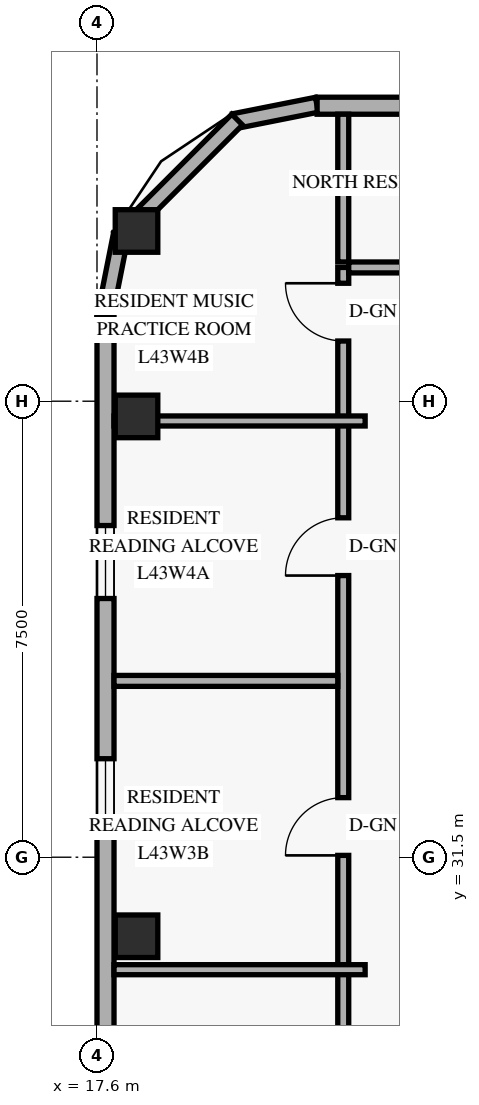
"""IFC4 building model, lengths in metres.
Left out: names, types, materials, properties, quantities, classifications, styles, units other than length and angle.
Written with IfcOpenShell. Run it as: python <this file> out.ifc"""

import sys

from ifc_helpers import new_model, si_unit, direction, frame, frame_2d, origin, origin_2d, place, context, subcontext, project, spatial, rectangle, extrude, element, fill, save


model = new_model("IFC4")
c1 = context("Model", 3, precision=1e-05, world=origin(), true_north=direction((0.0, 1.0)))
c2 = subcontext(c1, "Body", "Model", "MODEL_VIEW")
j1 = project(units=[si_unit("LENGTHUNIT", "METRE"), si_unit("PLANEANGLEUNIT", "RADIAN")], contexts=[c1])
p1 = place(None, origin())
s1 = spatial("IfcSite", under=j1, at=p1, CompositionType="ELEMENT")
p2 = place(p1, origin())
s2 = spatial("IfcBuilding", under=s1, at=p2, CompositionType="ELEMENT")
p3 = place(p2, frame((0.0, 0.0, 166.2)))
s3 = spatial("IfcBuildingStorey", under=s2, at=p3, CompositionType="ELEMENT", Elevation=166.2)
for number, where, z_axis, x_axis in (
    (1, (18.25, 30.2, 0.0), (0.0, 0.0, 1.0), (1.0, 0.0, 0.0)),
    (2, (18.25, 38.75, 0.0), (0.0, 0.0, 1.0), (1.0, 0.0, 0.0)),
    (3, (18.25, 41.8, 0.0), (0.0, 0.0, 1.0), (1.0, 0.0, 0.0)),
):
    element("IfcColumn", number, at=place(p3, frame(where, z_axis=z_axis, x_axis=x_axis)), inside=s3, PredefinedType="COLUMN", context=c2, shape_type="SweptSolid", body=[
        extrude(rectangle(XDim=0.7, YDim=0.7, at=origin_2d()), origin(), (0.0, 0.0, 1.0), 3.6),
    ])
p4 = place(p3, frame((21.217, 43.876, 0.0), z_axis=(0.0, 0.0, 1.0), x_axis=(-0.980809899341, -0.19496651342, 0.0)))
e4 = element("IfcWall", 4, at=p4, inside=s3, PredefinedType="SOLIDWALL", context=c2, shape_type="SweptSolid", body=[
    extrude(rectangle(XDim=1.389, YDim=0.25, at=frame_2d((0.694, 0.0))), origin(), (0.0, 0.0, 1.0), 3.36),
])
p5 = place(p3, frame((19.905, 43.632, 0.0), z_axis=(0.0, 0.0, 1.0), x_axis=(-0.707106781187, -0.707106781187, 0.0)))
e5 = element("IfcWall", 5, at=p5, inside=s3, PredefinedType="SOLIDWALL", context=c2, shape_type="SweptSolid", body=[
    extrude(rectangle(XDim=2.739, YDim=0.25, at=frame_2d((1.37, 0.0))), origin(), (0.0, 0.0, 1.0), 3.36),
])
p6 = place(p3, frame((17.995, 41.746, 0.0), z_axis=(0.0, 0.0, 1.0), x_axis=(-0.195135625965, -0.9807762678, 0.0)))
e6 = element("IfcWall", 6, at=p6, inside=s3, PredefinedType="SOLIDWALL", context=c2, shape_type="SweptSolid", body=[
    extrude(rectangle(XDim=1.389, YDim=0.25, at=frame_2d((0.694, 0.0))), origin(), (0.0, 0.0, 1.0), 3.36),
])
p7 = place(p3, frame((54.98, 43.86, 0.0), z_axis=(0.0, 0.0, 1.0), x_axis=(-1.0, 0.0, 0.0)))
e7 = element("IfcWall", 7, at=p7, inside=s3, PredefinedType="SOLIDWALL", context=c2, shape_type="SweptSolid", body=[
    extrude(rectangle(XDim=33.76, YDim=0.28, at=frame_2d((16.88, 0.0))), origin(), (0.0, 0.0, 1.0), 3.36),
])
p8 = place(p7, frame((28.055, 0.0, 0.85)))
e8 = element("IfcOpeningElement", 8, at=p8, cuts=e7, PredefinedType="OPENING", context=c2, shape_type="SweptSolid", body=[
    extrude(rectangle(XDim=1.8, YDim=1.6, at=frame_2d((0.9, 0.8))), frame((0.0, 0.15, 0.0), z_axis=(0.0, -1.0, 0.0), x_axis=(1.0, 0.0, 0.0)), (0.0, 0.0, 1.0), 0.3),
])
p9 = place(p7, frame((21.17, 0.0, 0.85)))
e9 = element("IfcOpeningElement", 9, at=p9, cuts=e7, PredefinedType="OPENING", context=c2, shape_type="SweptSolid", body=[
    extrude(rectangle(XDim=1.8, YDim=1.6, at=frame_2d((0.9, 0.8))), frame((0.0, 0.15, 0.0), z_axis=(0.0, -1.0, 0.0), x_axis=(1.0, 0.0, 0.0)), (0.0, 0.0, 1.0), 0.3),
])
p10 = place(p7, frame((15.207, 0.0, 0.85)))
e10 = element("IfcOpeningElement", 10, at=p10, cuts=e7, PredefinedType="OPENING", context=c2, shape_type="SweptSolid", body=[
    extrude(rectangle(XDim=1.8, YDim=1.6, at=frame_2d((0.9, 0.8))), frame((0.0, 0.15, 0.0), z_axis=(0.0, -1.0, 0.0), x_axis=(1.0, 0.0, 0.0)), (0.0, 0.0, 1.0), 0.3),
])
p11 = place(p7, frame((9.684, 0.0, 0.85)))
e11 = element("IfcOpeningElement", 11, at=p11, cuts=e7, PredefinedType="OPENING", context=c2, shape_type="SweptSolid", body=[
    extrude(rectangle(XDim=1.8, YDim=1.6, at=frame_2d((0.9, 0.8))), frame((0.0, 0.15, 0.0), z_axis=(0.0, -1.0, 0.0), x_axis=(1.0, 0.0, 0.0)), (0.0, 0.0, 1.0), 0.3),
])
p12 = place(p7, frame((7.014, 0.0, 0.85)))
e12 = element("IfcOpeningElement", 12, at=p12, cuts=e7, PredefinedType="OPENING", context=c2, shape_type="SweptSolid", body=[
    extrude(rectangle(XDim=1.2, YDim=1.5, at=frame_2d((0.6, 0.75))), frame((0.0, 0.15, 0.0), z_axis=(0.0, -1.0, 0.0), x_axis=(1.0, 0.0, 0.0)), (0.0, 0.0, 1.0), 0.3),
])
p13 = place(p7, frame((2.457, 0.0, 0.85)))
e13 = element("IfcOpeningElement", 13, at=p13, cuts=e7, PredefinedType="OPENING", context=c2, shape_type="SweptSolid", body=[
    extrude(rectangle(XDim=1.8, YDim=1.6, at=frame_2d((0.9, 0.8))), frame((0.0, 0.15, 0.0), z_axis=(0.0, -1.0, 0.0), x_axis=(1.0, 0.0, 0.0)), (0.0, 0.0, 1.0), 0.3),
])
p14 = place(p3, frame((17.74, 40.38, 0.0), z_axis=(0.0, 0.0, 1.0), x_axis=(0.0, -1.0, 0.0)))
e14 = element("IfcWall", 14, at=p14, inside=s3, PredefinedType="SOLIDWALL", context=c2, shape_type="SweptSolid", body=[
    extrude(rectangle(XDim=32.76, YDim=0.28, at=frame_2d((16.38, 0.0))), origin(), (0.0, 0.0, 1.0), 3.36),
])
p15 = place(p14, frame((28.135, 0.0, 0.85)))
e15 = element("IfcOpeningElement", 15, at=p15, cuts=e14, PredefinedType="OPENING", context=c2, shape_type="SweptSolid", body=[
    extrude(rectangle(XDim=1.2, YDim=1.5, at=frame_2d((0.6, 0.75))), frame((0.0, 0.15, 0.0), z_axis=(0.0, -1.0, 0.0), x_axis=(1.0, 0.0, 0.0)), (0.0, 0.0, 1.0), 0.3),
])
p16 = place(p14, frame((24.425, 0.0, 0.85)))
e16 = element("IfcOpeningElement", 16, at=p16, cuts=e14, PredefinedType="OPENING", context=c2, shape_type="SweptSolid", body=[
    extrude(rectangle(XDim=1.2, YDim=1.5, at=frame_2d((0.6, 0.75))), frame((0.0, 0.15, 0.0), z_axis=(0.0, -1.0, 0.0), x_axis=(1.0, 0.0, 0.0)), (0.0, 0.0, 1.0), 0.3),
])
p17 = place(p14, frame((18.38, 0.0, 0.85)))
e17 = element("IfcOpeningElement", 17, at=p17, cuts=e14, PredefinedType="OPENING", context=c2, shape_type="SweptSolid", body=[
    extrude(rectangle(XDim=1.2, YDim=1.5, at=frame_2d((0.6, 0.75))), frame((0.0, 0.15, 0.0), z_axis=(0.0, -1.0, 0.0), x_axis=(1.0, 0.0, 0.0)), (0.0, 0.0, 1.0), 0.3),
])
p18 = place(p14, frame((12.955, 0.0, 0.85)))
e18 = element("IfcOpeningElement", 18, at=p18, cuts=e14, PredefinedType="OPENING", context=c2, shape_type="SweptSolid", body=[
    extrude(rectangle(XDim=1.2, YDim=1.5, at=frame_2d((0.6, 0.75))), frame((0.0, 0.15, 0.0), z_axis=(0.0, -1.0, 0.0), x_axis=(1.0, 0.0, 0.0)), (0.0, 0.0, 1.0), 0.3),
])
p19 = place(p14, frame((7.26, 0.0, 0.85)))
e19 = element("IfcOpeningElement", 19, at=p19, cuts=e14, PredefinedType="OPENING", context=c2, shape_type="SweptSolid", body=[
    extrude(rectangle(XDim=1.2, YDim=1.5, at=frame_2d((0.6, 0.75))), frame((0.0, 0.15, 0.0), z_axis=(0.0, -1.0, 0.0), x_axis=(1.0, 0.0, 0.0)), (0.0, 0.0, 1.0), 0.3),
])
p20 = place(p14, frame((3.425, 0.0, 0.85)))
e20 = element("IfcOpeningElement", 20, at=p20, cuts=e14, PredefinedType="OPENING", context=c2, shape_type="SweptSolid", body=[
    extrude(rectangle(XDim=1.2, YDim=1.5, at=frame_2d((0.6, 0.75))), frame((0.0, 0.15, 0.0), z_axis=(0.0, -1.0, 0.0), x_axis=(1.0, 0.0, 0.0)), (0.0, 0.0, 1.0), 0.3),
])
p21 = place(p3, frame((21.65, 6.8, 0.0), z_axis=(0.0, 0.0, 1.0), x_axis=(0.0, 1.0, 0.0)))
e21 = element("IfcWall", 21, at=p21, inside=s3, PredefinedType="STANDARD", context=c2, shape_type="SweptSolid", body=[
    extrude(rectangle(XDim=34.4, YDim=0.18, at=frame_2d((17.2, 0.0))), origin(), (0.0, 0.0, 1.0), 2.73),
])
p22 = place(p21, frame((0.3, 0.0, 0.0)))
e22 = element("IfcOpeningElement", 22, at=p22, cuts=e21, PredefinedType="OPENING", context=c2, shape_type="SweptSolid", body=[
    extrude(rectangle(XDim=0.95, YDim=2.15, at=frame_2d((0.475, 1.075))), frame((0.0, 0.1, 0.0), z_axis=(0.0, -1.0, 0.0), x_axis=(1.0, 0.0, 0.0)), (0.0, 0.0, 1.0), 0.2),
])
p23 = place(p21, frame((3.718, 0.0, 0.0)))
e23 = element("IfcOpeningElement", 23, at=p23, cuts=e21, PredefinedType="OPENING", context=c2, shape_type="SweptSolid", body=[
    extrude(rectangle(XDim=0.95, YDim=2.15, at=frame_2d((0.475, 1.075))), frame((0.0, 0.1, 0.0), z_axis=(0.0, -1.0, 0.0), x_axis=(1.0, 0.0, 0.0)), (0.0, 0.0, 1.0), 0.2),
])
p24 = place(p21, frame((8.995, 0.0, 0.0)))
e24 = element("IfcOpeningElement", 24, at=p24, cuts=e21, PredefinedType="OPENING", context=c2, shape_type="SweptSolid", body=[
    extrude(rectangle(XDim=0.95, YDim=2.15, at=frame_2d((0.475, 1.075))), frame((0.0, 0.1, 0.0), z_axis=(0.0, -1.0, 0.0), x_axis=(1.0, 0.0, 0.0)), (0.0, 0.0, 1.0), 0.2),
])
p25 = place(p21, frame((14.105, 0.0, 0.0)))
e25 = element("IfcOpeningElement", 25, at=p25, cuts=e21, PredefinedType="OPENING", context=c2, shape_type="SweptSolid", body=[
    extrude(rectangle(XDim=0.95, YDim=2.15, at=frame_2d((0.475, 1.075))), frame((0.0, 0.1, 0.0), z_axis=(0.0, -1.0, 0.0), x_axis=(1.0, 0.0, 0.0)), (0.0, 0.0, 1.0), 0.2),
])
p26 = place(p21, frame((19.62, 0.0, 0.0)))
e26 = element("IfcOpeningElement", 26, at=p26, cuts=e21, PredefinedType="OPENING", context=c2, shape_type="SweptSolid", body=[
    extrude(rectangle(XDim=0.95, YDim=2.15, at=frame_2d((0.475, 1.075))), frame((0.0, 0.1, 0.0), z_axis=(0.0, -1.0, 0.0), x_axis=(1.0, 0.0, 0.0)), (0.0, 0.0, 1.0), 0.2),
])
p27 = place(p21, frame((24.73, 0.0, 0.0)))
e27 = element("IfcOpeningElement", 27, at=p27, cuts=e21, PredefinedType="OPENING", context=c2, shape_type="SweptSolid", body=[
    extrude(rectangle(XDim=0.95, YDim=2.15, at=frame_2d((0.475, 1.075))), frame((0.0, 0.1, 0.0), z_axis=(0.0, -1.0, 0.0), x_axis=(1.0, 0.0, 0.0)), (0.0, 0.0, 1.0), 0.2),
])
p28 = place(p21, frame((29.333, 0.0, 0.0)))
e28 = element("IfcOpeningElement", 28, at=p28, cuts=e21, PredefinedType="OPENING", context=c2, shape_type="SweptSolid", body=[
    extrude(rectangle(XDim=0.95, YDim=2.15, at=frame_2d((0.475, 1.075))), frame((0.0, 0.1, 0.0), z_axis=(0.0, -1.0, 0.0), x_axis=(1.0, 0.0, 0.0)), (0.0, 0.0, 1.0), 0.2),
])
p29 = place(p21, frame((33.19, 0.0, 0.0)))
e29 = element("IfcOpeningElement", 29, at=p29, cuts=e21, PredefinedType="OPENING", context=c2, shape_type="SweptSolid", body=[
    extrude(rectangle(XDim=0.95, YDim=2.15, at=frame_2d((0.475, 1.075))), frame((0.0, 0.1, 0.0), z_axis=(0.0, -1.0, 0.0), x_axis=(1.0, 0.0, 0.0)), (0.0, 0.0, 1.0), 0.2),
])
p30 = place(p3, frame((21.74, 41.2, 0.0), z_axis=(0.0, 0.0, 1.0), x_axis=(1.0, 0.0, 0.0)))
e30 = element("IfcWall", 30, at=p30, inside=s3, PredefinedType="STANDARD", context=c2, shape_type="SweptSolid", body=[
    extrude(rectangle(XDim=13.68, YDim=0.18, at=frame_2d((6.84, 0.0))), origin(), (0.0, 0.0, 1.0), 2.73),
])
p31 = place(p30, frame((2.95, 0.0, 0.0)))
e31 = element("IfcOpeningElement", 31, at=p31, cuts=e30, PredefinedType="OPENING", context=c2, shape_type="SweptSolid", body=[
    extrude(rectangle(XDim=0.95, YDim=2.15, at=frame_2d((0.475, 1.075))), frame((0.0, 0.1, 0.0), z_axis=(0.0, -1.0, 0.0), x_axis=(1.0, 0.0, 0.0)), (0.0, 0.0, 1.0), 0.2),
])
p32 = place(p30, frame((10.11, 0.0, 0.0)))
e32 = element("IfcOpeningElement", 32, at=p32, cuts=e30, PredefinedType="OPENING", context=c2, shape_type="SweptSolid", body=[
    extrude(rectangle(XDim=0.95, YDim=2.15, at=frame_2d((0.475, 1.075))), frame((0.0, 0.1, 0.0), z_axis=(0.0, -1.0, 0.0), x_axis=(1.0, 0.0, 0.0)), (0.0, 0.0, 1.0), 0.2),
])
p33 = place(p3, frame((21.65, 41.29, 0.0), z_axis=(0.0, 0.0, 1.0), x_axis=(0.0, 1.0, 0.0)))
e33 = element("IfcWall", 33, at=p33, inside=s3, PredefinedType="PARTITIONING", context=c2, shape_type="SweptSolid", body=[
    extrude(rectangle(XDim=2.43, YDim=0.18, at=frame_2d((1.215, 0.0))), origin(), (0.0, 0.0, 1.0), 2.879),
])
p34 = place(p3, frame((17.88, 29.65, 0.0), z_axis=(0.0, 0.0, 1.0), x_axis=(1.0, 0.0, 0.0)))
e34 = element("IfcWall", 34, at=p34, inside=s3, PredefinedType="PARTITIONING", context=c2, shape_type="SweptSolid", body=[
    extrude(rectangle(XDim=4.13, YDim=0.165, at=frame_2d((2.065, 0.0))), origin(), (0.0, 0.0, 1.0), 2.879),
])
p35 = place(p3, frame((17.88, 34.4, 0.0), z_axis=(0.0, 0.0, 1.0), x_axis=(1.0, 0.0, 0.0)))
e35 = element("IfcWall", 35, at=p35, inside=s3, PredefinedType="PARTITIONING", context=c2, shape_type="SweptSolid", body=[
    extrude(rectangle(XDim=3.68, YDim=0.18, at=frame_2d((1.84, 0.0))), origin(), (0.0, 0.0, 1.0), 2.879),
])
p36 = place(p3, frame((17.88, 38.675, 0.0), z_axis=(0.0, 0.0, 1.0), x_axis=(1.0, 0.0, 0.0)))
e36 = element("IfcWall", 36, at=p36, inside=s3, PredefinedType="PARTITIONING", context=c2, shape_type="SweptSolid", body=[
    extrude(rectangle(XDim=4.13, YDim=0.165, at=frame_2d((2.065, 0.0))), origin(), (0.0, 0.0, 1.0), 2.73),
])
p37 = place(p19, origin())
e37 = element("IfcWindow", 37, at=p37, inside=s3, PartitioningType="SINGLE_PANEL", PredefinedType="WINDOW", context=c2, shape_type="SweptSolid", body=[
    extrude(rectangle(XDim=1.2, YDim=1.5, at=frame_2d((0.6, 0.75))), frame((0.0, 0.03, 0.0), z_axis=(0.0, -1.0, 0.0), x_axis=(1.0, 0.0, 0.0)), (0.0, 0.0, 1.0), 0.06),
])
fill(e19, e37)
p38 = place(p20, origin())
e38 = element("IfcWindow", 38, at=p38, inside=s3, PartitioningType="SINGLE_PANEL", PredefinedType="WINDOW", context=c2, shape_type="SweptSolid", body=[
    extrude(rectangle(XDim=1.2, YDim=1.5, at=frame_2d((0.6, 0.75))), frame((0.0, 0.03, 0.0), z_axis=(0.0, -1.0, 0.0), x_axis=(1.0, 0.0, 0.0)), (0.0, 0.0, 1.0), 0.06),
])
fill(e20, e38)
p39 = place(p27, origin())
e39 = element("IfcDoor", 39, at=p39, inside=s3, OperationType="SINGLE_SWING_LEFT", PredefinedType="DOOR", context=c2, shape_type="SweptSolid", body=[
    extrude(rectangle(XDim=0.95, YDim=2.15, at=frame_2d((0.475, 1.075))), frame((0.0, 0.025, 0.0), z_axis=(0.0, -1.0, 0.0), x_axis=(1.0, 0.0, 0.0)), (0.0, 0.0, 1.0), 0.05),
])
fill(e27, e39)
p40 = place(p28, origin())
e40 = element("IfcDoor", 40, at=p40, inside=s3, OperationType="SINGLE_SWING_LEFT", PredefinedType="DOOR", context=c2, shape_type="SweptSolid", body=[
    extrude(rectangle(XDim=0.95, YDim=2.15, at=frame_2d((0.475, 1.075))), frame((0.0, 0.025, 0.0), z_axis=(0.0, -1.0, 0.0), x_axis=(1.0, 0.0, 0.0)), (0.0, 0.0, 1.0), 0.05),
])
fill(e28, e40)
p41 = place(p29, origin())
e41 = element("IfcDoor", 41, at=p41, inside=s3, OperationType="SINGLE_SWING_RIGHT", PredefinedType="DOOR", context=c2, shape_type="SweptSolid", body=[
    extrude(rectangle(XDim=0.95, YDim=2.15, at=frame_2d((0.475, 1.075))), frame((0.0, 0.025, 0.0), z_axis=(0.0, -1.0, 0.0), x_axis=(1.0, 0.0, 0.0)), (0.0, 0.0, 1.0), 0.05),
])
fill(e29, e41)
save(model, sys.argv[1])
